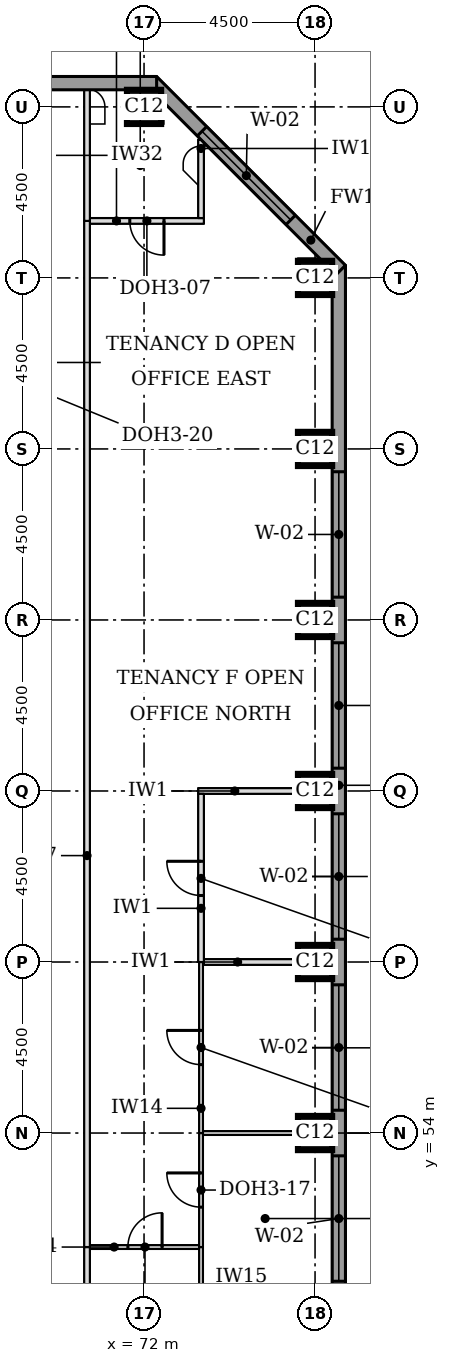
"""IFC4 building model, lengths in metres.
Left out: names, types, materials, properties, quantities, classifications, styles, units other than length and angle.
Written with IfcOpenShell. Run it as: python <this file> out.ifc"""

import sys

from ifc_helpers import new_model, si_unit, direction, frame, frame_2d, origin, origin_2d, place, context, subcontext, project, spatial, rectangle, extrude, element, fill, save


model = new_model("IFC4")
c1 = context("Model", 3, precision=1e-05, world=origin(), true_north=direction((0.0, 1.0)))
c2 = subcontext(c1, "Body", "Model", "MODEL_VIEW")
j1 = project(units=[si_unit("LENGTHUNIT", "METRE"), si_unit("PLANEANGLEUNIT", "RADIAN")], contexts=[c1])
p1 = place(None, origin())
s1 = spatial("IfcSite", under=j1, at=p1, CompositionType="ELEMENT")
p2 = place(p1, origin())
s2 = spatial("IfcBuilding", under=s1, at=p2, CompositionType="ELEMENT")
p3 = place(p2, frame((0.0, 0.0, 162.5)))
s3 = spatial("IfcBuildingStorey", under=s2, at=p3, CompositionType="ELEMENT", Elevation=162.5)
for number, where, z_axis, x_axis in (
    (1, (76.5, 54.0, 0.0), (0.0, 0.0, 1.0), (1.0, 0.0, 0.0)),
    (2, (76.5, 58.5, 0.0), (0.0, 0.0, 1.0), (1.0, 0.0, 0.0)),
    (3, (76.5, 63.0, 0.0), (0.0, 0.0, 1.0), (1.0, 0.0, 0.0)),
    (4, (76.5, 67.5, 0.0), (0.0, 0.0, 1.0), (1.0, 0.0, 0.0)),
    (5, (76.5, 72.0, 0.0), (0.0, 0.0, 1.0), (1.0, 0.0, 0.0)),
    (6, (76.5, 76.5, 0.0), (0.0, 0.0, 1.0), (1.0, 0.0, 0.0)),
    (7, (72.0, 81.0, 0.0), (0.0, 0.0, 1.0), (1.0, 0.0, 0.0)),
):
    element("IfcColumn", number, at=place(p3, frame(where, z_axis=z_axis, x_axis=x_axis)), inside=s3, PredefinedType="COLUMN", context=c2, shape_type="SweptSolid", body=[
        extrude(rectangle(XDim=0.9, YDim=0.9, at=origin_2d()), origin(), (0.0, 0.0, 1.0), 3.7),
    ])
p4 = place(p3, frame((77.125, 44.669, 0.0), z_axis=(0.0, 0.0, 1.0), x_axis=(0.0, 1.0, 0.0)))
e8 = element("IfcWall", 8, at=p4, inside=s3, PredefinedType="STANDARD", context=c2, shape_type="SweptSolid", body=[
    extrude(rectangle(XDim=32.163, YDim=0.35, at=frame_2d((16.081, 0.0))), origin(), (0.0, 0.0, 1.0), 3.525),
])
p5 = place(p4, frame((5.431, 0.0, 0.9)))
e9 = element("IfcOpeningElement", 9, at=p5, cuts=e8, PredefinedType="OPENING", context=c2, shape_type="SweptSolid", body=[
    extrude(rectangle(XDim=3.3, YDim=1.9, at=frame_2d((1.65, 0.95))), frame((0.0, 0.185, 0.0), z_axis=(0.0, -1.0, 0.0), x_axis=(1.0, 0.0, 0.0)), (0.0, 0.0, 1.0), 0.37),
])
p6 = place(p4, frame((9.931, 0.0, 0.9)))
e10 = element("IfcOpeningElement", 10, at=p6, cuts=e8, PredefinedType="OPENING", context=c2, shape_type="SweptSolid", body=[
    extrude(rectangle(XDim=3.3, YDim=1.9, at=frame_2d((1.65, 0.95))), frame((0.0, 0.185, 0.0), z_axis=(0.0, -1.0, 0.0), x_axis=(1.0, 0.0, 0.0)), (0.0, 0.0, 1.0), 0.37),
])
p7 = place(p4, frame((14.431, 0.0, 0.9)))
e11 = element("IfcOpeningElement", 11, at=p7, cuts=e8, PredefinedType="OPENING", context=c2, shape_type="SweptSolid", body=[
    extrude(rectangle(XDim=3.3, YDim=1.9, at=frame_2d((1.65, 0.95))), frame((0.0, 0.185, 0.0), z_axis=(0.0, -1.0, 0.0), x_axis=(1.0, 0.0, 0.0)), (0.0, 0.0, 1.0), 0.37),
])
p8 = place(p4, frame((18.931, 0.0, 0.9)))
e12 = element("IfcOpeningElement", 12, at=p8, cuts=e8, PredefinedType="OPENING", context=c2, shape_type="SweptSolid", body=[
    extrude(rectangle(XDim=3.3, YDim=1.9, at=frame_2d((1.65, 0.95))), frame((0.0, 0.185, 0.0), z_axis=(0.0, -1.0, 0.0), x_axis=(1.0, 0.0, 0.0)), (0.0, 0.0, 1.0), 0.37),
])
p9 = place(p4, frame((23.431, 0.0, 0.9)))
e13 = element("IfcOpeningElement", 13, at=p9, cuts=e8, PredefinedType="OPENING", context=c2, shape_type="SweptSolid", body=[
    extrude(rectangle(XDim=3.3, YDim=1.9, at=frame_2d((1.65, 0.95))), frame((0.0, 0.185, 0.0), z_axis=(0.0, -1.0, 0.0), x_axis=(1.0, 0.0, 0.0)), (0.0, 0.0, 1.0), 0.37),
])
p10 = place(p3, frame((77.176, 76.708, 0.0), z_axis=(0.0, 0.0, 1.0), x_axis=(-0.707106781187, 0.707106781187, 0.0)))
e14 = element("IfcWall", 14, at=p10, inside=s3, PredefinedType="STANDARD", context=c2, shape_type="SweptSolid", body=[
    extrude(rectangle(XDim=7.027, YDim=0.35, at=frame_2d((3.513, 0.0))), origin(), (0.0, 0.0, 1.0), 3.525),
])
p11 = place(p10, frame((1.863, 0.0, 0.9)))
e15 = element("IfcOpeningElement", 15, at=p11, cuts=e14, PredefinedType="OPENING", context=c2, shape_type="SweptSolid", body=[
    extrude(rectangle(XDim=3.3, YDim=1.9, at=frame_2d((1.65, 0.95))), frame((0.0, 0.185, 0.0), z_axis=(0.0, -1.0, 0.0), x_axis=(1.0, 0.0, 0.0)), (0.0, 0.0, 1.0), 0.37),
])
p12 = place(p3, frame((72.331, 81.625, 0.0), z_axis=(0.0, 0.0, 1.0), x_axis=(-1.0, 0.0, 0.0)))
e16 = element("IfcWall", 16, at=p12, inside=s3, PredefinedType="STANDARD", context=c2, shape_type="SweptSolid", body=[
    extrude(rectangle(XDim=32.163, YDim=0.35, at=frame_2d((16.081, 0.0))), origin(), (0.0, 0.0, 1.0), 3.525),
])
p13 = place(p12, frame((5.431, 0.0, 0.9)))
e17 = element("IfcOpeningElement", 17, at=p13, cuts=e16, PredefinedType="OPENING", context=c2, shape_type="SweptSolid", body=[
    extrude(rectangle(XDim=3.3, YDim=1.9, at=frame_2d((1.65, 0.95))), frame((0.0, 0.185, 0.0), z_axis=(0.0, -1.0, 0.0), x_axis=(1.0, 0.0, 0.0)), (0.0, 0.0, 1.0), 0.37),
])
p14 = place(p12, frame((9.931, 0.0, 0.9)))
e18 = element("IfcOpeningElement", 18, at=p14, cuts=e16, PredefinedType="OPENING", context=c2, shape_type="SweptSolid", body=[
    extrude(rectangle(XDim=3.3, YDim=1.9, at=frame_2d((1.65, 0.95))), frame((0.0, 0.185, 0.0), z_axis=(0.0, -1.0, 0.0), x_axis=(1.0, 0.0, 0.0)), (0.0, 0.0, 1.0), 0.37),
])
p15 = place(p12, frame((14.431, 0.0, 0.9)))
e19 = element("IfcOpeningElement", 19, at=p15, cuts=e16, PredefinedType="OPENING", context=c2, shape_type="SweptSolid", body=[
    extrude(rectangle(XDim=3.3, YDim=1.9, at=frame_2d((1.65, 0.95))), frame((0.0, 0.185, 0.0), z_axis=(0.0, -1.0, 0.0), x_axis=(1.0, 0.0, 0.0)), (0.0, 0.0, 1.0), 0.37),
])
p16 = place(p12, frame((18.931, 0.0, 0.9)))
e20 = element("IfcOpeningElement", 20, at=p16, cuts=e16, PredefinedType="OPENING", context=c2, shape_type="SweptSolid", body=[
    extrude(rectangle(XDim=3.3, YDim=1.9, at=frame_2d((1.65, 0.95))), frame((0.0, 0.185, 0.0), z_axis=(0.0, -1.0, 0.0), x_axis=(1.0, 0.0, 0.0)), (0.0, 0.0, 1.0), 0.37),
])
p17 = place(p12, frame((23.431, 0.0, 0.9)))
e21 = element("IfcOpeningElement", 21, at=p17, cuts=e16, PredefinedType="OPENING", context=c2, shape_type="SweptSolid", body=[
    extrude(rectangle(XDim=3.3, YDim=1.9, at=frame_2d((1.65, 0.95))), frame((0.0, 0.185, 0.0), z_axis=(0.0, -1.0, 0.0), x_axis=(1.0, 0.0, 0.0)), (0.0, 0.0, 1.0), 0.37),
])
p18 = place(p3, frame((70.575, 51.0, 0.0), z_axis=(0.0, 0.0, 1.0), x_axis=(1.0, 0.0, 0.0)))
e22 = element("IfcWall", 22, at=p18, inside=s3, PredefinedType="PARTITIONING", context=c2, shape_type="SweptSolid", body=[
    extrude(rectangle(XDim=2.875, YDim=0.1, at=frame_2d((1.438, 0.0))), origin(), (0.0, 0.0, 1.0), 3.55),
])
p19 = place(p18, frame((1.0, 0.0, 0.0)))
e23 = element("IfcOpeningElement", 23, at=p19, cuts=e22, PredefinedType="OPENING", context=c2, shape_type="SweptSolid", body=[
    extrude(rectangle(XDim=0.9, YDim=2.1, at=frame_2d((0.45, 1.05))), frame((0.0, 0.06, 0.0), z_axis=(0.0, -1.0, 0.0), x_axis=(1.0, 0.0, 0.0)), (0.0, 0.0, 1.0), 0.12),
])
p20 = place(p3, frame((73.55, 54.0, 0.0), z_axis=(0.0, 0.0, 1.0), x_axis=(1.0, 0.0, 0.0)))
e24 = element("IfcWall", 24, at=p20, inside=s3, PredefinedType="PARTITIONING", context=c2, shape_type="SweptSolid", body=[
    extrude(rectangle(XDim=3.4, YDim=0.1, at=frame_2d((1.7, 0.0))), origin(), (0.0, 0.0, 1.0), 3.55),
])
p21 = place(p3, frame((73.575, 58.5, 0.0), z_axis=(0.0, 0.0, 1.0), x_axis=(1.0, 0.0, 0.0)))
e25 = element("IfcWall", 25, at=p21, inside=s3, PredefinedType="PARTITIONING", context=c2, shape_type="SweptSolid", body=[
    extrude(rectangle(XDim=3.375, YDim=0.15, at=frame_2d((1.688, 0.0))), origin(), (0.0, 0.0, 1.0), 3.55),
])
p22 = place(p3, frame((73.425, 63.0, 0.0), z_axis=(0.0, 0.0, 1.0), x_axis=(1.0, 0.0, 0.0)))
e26 = element("IfcWall", 26, at=p22, inside=s3, PredefinedType="PARTITIONING", context=c2, shape_type="SweptSolid", body=[
    extrude(rectangle(XDim=3.525, YDim=0.15, at=frame_2d((1.762, 0.0))), origin(), (0.0, 0.0, 1.0), 3.55),
])
p23 = place(p3, frame((70.575, 78.0, 0.0), z_axis=(0.0, 0.0, 1.0), x_axis=(1.0, 0.0, 0.0)))
e27 = element("IfcWall", 27, at=p23, inside=s3, PredefinedType="PARTITIONING", context=c2, shape_type="SweptSolid", body=[
    extrude(rectangle(XDim=3.0, YDim=0.15, at=frame_2d((1.5, 0.0))), origin(), (0.0, 0.0, 1.0), 3.55),
])
p24 = place(p23, frame((1.05, 0.0, 0.0)))
e28 = element("IfcOpeningElement", 28, at=p24, cuts=e27, PredefinedType="OPENING", context=c2, shape_type="SweptSolid", body=[
    extrude(rectangle(XDim=0.9, YDim=2.1, at=frame_2d((0.45, 1.05))), frame((0.0, 0.085, 0.0), z_axis=(0.0, -1.0, 0.0), x_axis=(1.0, 0.0, 0.0)), (0.0, 0.0, 1.0), 0.17),
])
p25 = place(p3, frame((70.5, 46.5, 0.0), z_axis=(0.0, 0.0, 1.0), x_axis=(0.0, 1.0, 0.0)))
e29 = element("IfcWall", 29, at=p25, inside=s3, PredefinedType="PARTITIONING", context=c2, shape_type="SweptSolid", body=[
    extrude(rectangle(XDim=4.5, YDim=0.15, at=frame_2d((2.25, 0.0))), origin(), (0.0, 0.0, 1.0), 3.55),
])
p26 = place(p25, frame((1.75, 0.0, 0.0)))
e30 = element("IfcOpeningElement", 30, at=p26, cuts=e29, PredefinedType="OPENING", context=c2, shape_type="SweptSolid", body=[
    extrude(rectangle(XDim=1.0, YDim=2.1, at=frame_2d((0.5, 1.05))), frame((0.0, 0.085, 0.0), z_axis=(0.0, -1.0, 0.0), x_axis=(1.0, 0.0, 0.0)), (0.0, 0.0, 1.0), 0.17),
])
p27 = place(p3, frame((73.5, 49.55, 0.0), z_axis=(0.0, 0.0, 1.0), x_axis=(0.0, 1.0, 0.0)))
e31 = element("IfcWall", 31, at=p27, inside=s3, PredefinedType="PARTITIONING", context=c2, shape_type="SweptSolid", body=[
    extrude(rectangle(XDim=1.45, YDim=0.1, at=frame_2d((0.725, 0.0))), origin(), (0.0, 0.0, 1.0), 3.55),
])
p28 = place(p3, frame((70.5, 51.0, 0.0), z_axis=(0.0, 0.0, 1.0), x_axis=(0.0, 1.0, 0.0)))
e32 = element("IfcWall", 32, at=p28, inside=s3, PredefinedType="PARTITIONING", context=c2, shape_type="SweptSolid", body=[
    extrude(rectangle(XDim=27.0, YDim=0.15, at=frame_2d((13.5, 0.0))), origin(), (0.0, 0.0, 1.0), 3.55),
])
p29 = place(p3, frame((73.5, 51.0, 0.0), z_axis=(0.0, 0.0, 1.0), x_axis=(0.0, 1.0, 0.0)))
e33 = element("IfcWall", 33, at=p29, inside=s3, PredefinedType="PARTITIONING", context=c2, shape_type="SweptSolid", body=[
    extrude(rectangle(XDim=3.0, YDim=0.1, at=frame_2d((1.5, 0.0))), origin(), (0.0, 0.0, 1.0), 3.55),
])
p30 = place(p29, frame((1.05, 0.0, 0.0)))
e34 = element("IfcOpeningElement", 34, at=p30, cuts=e33, PredefinedType="OPENING", context=c2, shape_type="SweptSolid", body=[
    extrude(rectangle(XDim=0.9, YDim=2.1, at=frame_2d((0.45, 1.05))), frame((0.0, 0.06, 0.0), z_axis=(0.0, -1.0, 0.0), x_axis=(1.0, 0.0, 0.0)), (0.0, 0.0, 1.0), 0.12),
])
p31 = place(p3, frame((73.5, 54.0, 0.0), z_axis=(0.0, 0.0, 1.0), x_axis=(0.0, 1.0, 0.0)))
e35 = element("IfcWall", 35, at=p31, inside=s3, PredefinedType="PARTITIONING", context=c2, shape_type="SweptSolid", body=[
    extrude(rectangle(XDim=4.5, YDim=0.1, at=frame_2d((2.25, 0.0))), origin(), (0.0, 0.0, 1.0), 3.55),
])
p32 = place(p31, frame((1.8, 0.0, 0.0)))
e36 = element("IfcOpeningElement", 36, at=p32, cuts=e35, PredefinedType="OPENING", context=c2, shape_type="SweptSolid", body=[
    extrude(rectangle(XDim=0.9, YDim=2.1, at=frame_2d((0.45, 1.05))), frame((0.0, 0.06, 0.0), z_axis=(0.0, -1.0, 0.0), x_axis=(1.0, 0.0, 0.0)), (0.0, 0.0, 1.0), 0.12),
])
p33 = place(p3, frame((73.5, 58.5, 0.0), z_axis=(0.0, 0.0, 1.0), x_axis=(0.0, 1.0, 0.0)))
e37 = element("IfcWall", 37, at=p33, inside=s3, PredefinedType="PARTITIONING", context=c2, shape_type="SweptSolid", body=[
    extrude(rectangle(XDim=4.425, YDim=0.15, at=frame_2d((2.212, 0.0))), origin(), (0.0, 0.0, 1.0), 3.55),
])
p34 = place(p33, frame((1.75, 0.0, 0.0)))
e38 = element("IfcOpeningElement", 38, at=p34, cuts=e37, PredefinedType="OPENING", context=c2, shape_type="SweptSolid", body=[
    extrude(rectangle(XDim=0.9, YDim=2.1, at=frame_2d((0.45, 1.05))), frame((0.0, 0.085, 0.0), z_axis=(0.0, -1.0, 0.0), x_axis=(1.0, 0.0, 0.0)), (0.0, 0.0, 1.0), 0.17),
])
p35 = place(p3, frame((70.5, 78.0, 0.0), z_axis=(0.0, 0.0, 1.0), x_axis=(0.0, 1.0, 0.0)))
e39 = element("IfcWall", 39, at=p35, inside=s3, PredefinedType="PARTITIONING", context=c2, shape_type="SweptSolid", body=[
    extrude(rectangle(XDim=3.45, YDim=0.15, at=frame_2d((1.725, 0.0))), origin(), (0.0, 0.0, 1.0), 3.55),
])
p36 = place(p3, frame((73.5, 78.075, 0.0), z_axis=(0.0, 0.0, 1.0), x_axis=(0.0, 1.0, 0.0)))
e40 = element("IfcWall", 40, at=p36, inside=s3, PredefinedType="PARTITIONING", context=c2, shape_type="SweptSolid", body=[
    extrude(rectangle(XDim=2.062, YDim=0.15, at=frame_2d((1.031, 0.0))), origin(), (0.0, 0.0, 1.0), 3.55),
])
p37 = place(p5, origin())
e41 = element("IfcWindow", 41, at=p37, inside=s3, PartitioningType="SINGLE_PANEL", PredefinedType="WINDOW", context=c2, shape_type="SweptSolid", body=[
    extrude(rectangle(XDim=3.3, YDim=1.9, at=frame_2d((1.65, 0.95))), frame((0.0, 0.085, 0.0), z_axis=(0.0, -1.0, 0.0), x_axis=(1.0, 0.0, 0.0)), (0.0, 0.0, 1.0), 0.06),
])
fill(e9, e41)
p38 = place(p6, origin())
e42 = element("IfcWindow", 42, at=p38, inside=s3, PartitioningType="SINGLE_PANEL", PredefinedType="WINDOW", context=c2, shape_type="SweptSolid", body=[
    extrude(rectangle(XDim=3.3, YDim=1.9, at=frame_2d((1.65, 0.95))), frame((0.0, 0.085, 0.0), z_axis=(0.0, -1.0, 0.0), x_axis=(1.0, 0.0, 0.0)), (0.0, 0.0, 1.0), 0.06),
])
fill(e10, e42)
p39 = place(p7, origin())
e43 = element("IfcWindow", 43, at=p39, inside=s3, PartitioningType="SINGLE_PANEL", PredefinedType="WINDOW", context=c2, shape_type="SweptSolid", body=[
    extrude(rectangle(XDim=3.3, YDim=1.9, at=frame_2d((1.65, 0.95))), frame((0.0, 0.085, 0.0), z_axis=(0.0, -1.0, 0.0), x_axis=(1.0, 0.0, 0.0)), (0.0, 0.0, 1.0), 0.06),
])
fill(e11, e43)
p40 = place(p8, origin())
e44 = element("IfcWindow", 44, at=p40, inside=s3, PartitioningType="SINGLE_PANEL", PredefinedType="WINDOW", context=c2, shape_type="SweptSolid", body=[
    extrude(rectangle(XDim=3.3, YDim=1.9, at=frame_2d((1.65, 0.95))), frame((0.0, 0.085, 0.0), z_axis=(0.0, -1.0, 0.0), x_axis=(1.0, 0.0, 0.0)), (0.0, 0.0, 1.0), 0.06),
])
fill(e12, e44)
p41 = place(p9, origin())
e45 = element("IfcWindow", 45, at=p41, inside=s3, PartitioningType="SINGLE_PANEL", PredefinedType="WINDOW", context=c2, shape_type="SweptSolid", body=[
    extrude(rectangle(XDim=3.3, YDim=1.9, at=frame_2d((1.65, 0.95))), frame((0.0, 0.085, 0.0), z_axis=(0.0, -1.0, 0.0), x_axis=(1.0, 0.0, 0.0)), (0.0, 0.0, 1.0), 0.06),
])
fill(e13, e45)
p42 = place(p11, origin())
e46 = element("IfcWindow", 46, at=p42, inside=s3, PartitioningType="SINGLE_PANEL", PredefinedType="WINDOW", context=c2, shape_type="SweptSolid", body=[
    extrude(rectangle(XDim=3.3, YDim=1.9, at=frame_2d((1.65, 0.95))), frame((0.0, 0.085, 0.0), z_axis=(0.0, -1.0, 0.0), x_axis=(1.0, 0.0, 0.0)), (0.0, 0.0, 1.0), 0.06),
])
fill(e15, e46)
p43 = place(p19, origin())
e47 = element("IfcDoor", 47, at=p43, inside=s3, OperationType="SINGLE_SWING_RIGHT", PredefinedType="DOOR", context=c2, shape_type="SweptSolid", body=[
    extrude(rectangle(XDim=0.9, YDim=2.1, at=frame_2d((0.45, 1.05))), frame((0.0, 0.025, 0.0), z_axis=(0.0, -1.0, 0.0), x_axis=(1.0, 0.0, 0.0)), (0.0, 0.0, 1.0), 0.05),
])
fill(e23, e47)
p44 = place(p30, origin())
e48 = element("IfcDoor", 48, at=p44, inside=s3, OperationType="SINGLE_SWING_RIGHT", PredefinedType="DOOR", context=c2, shape_type="SweptSolid", body=[
    extrude(rectangle(XDim=0.9, YDim=2.1, at=frame_2d((0.45, 1.05))), frame((0.0, 0.025, 0.0), z_axis=(0.0, -1.0, 0.0), x_axis=(1.0, 0.0, 0.0)), (0.0, 0.0, 1.0), 0.05),
])
fill(e34, e48)
p45 = place(p32, origin())
e49 = element("IfcDoor", 49, at=p45, inside=s3, OperationType="SINGLE_SWING_RIGHT", PredefinedType="DOOR", context=c2, shape_type="SweptSolid", body=[
    extrude(rectangle(XDim=0.9, YDim=2.1, at=frame_2d((0.45, 1.05))), frame((0.0, 0.025, 0.0), z_axis=(0.0, -1.0, 0.0), x_axis=(1.0, 0.0, 0.0)), (0.0, 0.0, 1.0), 0.05),
])
fill(e36, e49)
p46 = place(p24, frame((0.9, 0.0, 0.0), z_axis=(0.0, 0.0, 1.0), x_axis=(-1.0, 0.0, 0.0)))
e50 = element("IfcDoor", 50, at=p46, inside=s3, OperationType="SINGLE_SWING_LEFT", PredefinedType="DOOR", context=c2, shape_type="SweptSolid", body=[
    extrude(rectangle(XDim=0.9, YDim=2.1, at=frame_2d((0.45, 1.05))), frame((0.0, 0.025, 0.0), z_axis=(0.0, -1.0, 0.0), x_axis=(1.0, 0.0, 0.0)), (0.0, 0.0, 1.0), 0.05),
])
fill(e28, e50)
p47 = place(p34, origin())
e51 = element("IfcDoor", 51, at=p47, inside=s3, OperationType="SINGLE_SWING_RIGHT", PredefinedType="DOOR", context=c2, shape_type="SweptSolid", body=[
    extrude(rectangle(XDim=0.9, YDim=2.1, at=frame_2d((0.45, 1.05))), frame((0.0, 0.025, 0.0), z_axis=(0.0, -1.0, 0.0), x_axis=(1.0, 0.0, 0.0)), (0.0, 0.0, 1.0), 0.05),
])
fill(e38, e51)
save(model, sys.argv[1])
